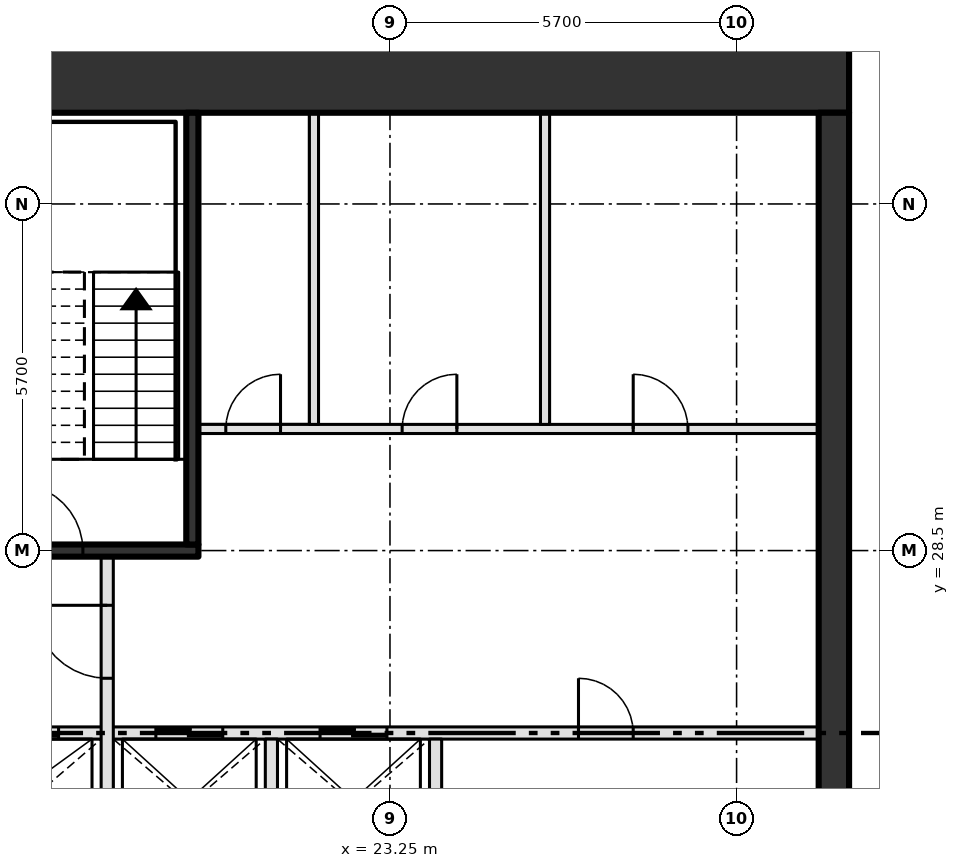
"""IFC4 building model, lengths in metres.
Left out: names, types, materials, properties, quantities, classifications, styles, units other than length and angle.
Written with IfcOpenShell. Run it as: python <this file> out.ifc"""

import sys

from ifc_helpers import new_model, si_unit, direction, frame, frame_2d, origin, place, context, subcontext, project, spatial, rectangle, extrude, element, fill, save


model = new_model("IFC4")
c1 = context("Model", 3, precision=1e-05, world=origin(), true_north=direction((0.0, 1.0)))
c2 = subcontext(c1, "Body", "Model", "MODEL_VIEW")
j1 = project(units=[si_unit("LENGTHUNIT", "METRE"), si_unit("PLANEANGLEUNIT", "RADIAN")], contexts=[c1])
p1 = place(None, origin())
s1 = spatial("IfcSite", under=j1, at=p1, CompositionType="ELEMENT")
p2 = place(p1, origin())
s2 = spatial("IfcBuilding", under=s1, at=p2, CompositionType="ELEMENT")
p3 = place(p2, frame((0.0, 0.0, 366.6)))
s3 = spatial("IfcBuildingStorey", under=s2, at=p3, CompositionType="ELEMENT", Elevation=366.6)
p4 = place(p3, frame((8.0, 36.3, -0.3), z_axis=(0.0, 0.0, 1.0), x_axis=(1.0, 0.0, 0.0)))
e1 = element("IfcWall", 1, at=p4, inside=s3, PredefinedType="SHEAR", context=c2, shape_type="SweptSolid", body=[
    extrude(rectangle(XDim=22.8, YDim=1.2, at=frame_2d((11.4, 0.0))), origin(), (0.0, 0.0, 1.0), 4.2),
])
p5 = place(p4, frame((2.3, 0.0, 0.3)))
e2 = element("IfcOpeningElement", 2, at=p5, cuts=e1, PredefinedType="OPENING", context=c2, shape_type="SweptSolid", body=[
    extrude(rectangle(XDim=1.8, YDim=2.1, at=frame_2d((0.9, 1.05))), frame((0.0, 0.61, 0.0), z_axis=(0.0, -1.0, 0.0), x_axis=(1.0, 0.0, 0.0)), (0.0, 0.0, 1.0), 1.22),
])
p6 = place(p3, frame((30.55, 14.6, -0.3), z_axis=(0.0, 0.0, 1.0), x_axis=(0.0, 1.0, 0.0)))
e3 = element("IfcWall", 3, at=p6, inside=s3, PredefinedType="SHEAR", context=c2, shape_type="SweptSolid", body=[
    extrude(rectangle(XDim=21.1, YDim=0.5, at=frame_2d((10.55, 0.0))), origin(), (0.0, 0.0, 1.0), 4.2),
])
p7 = place(p3, frame((13.35, 25.5, 0.0), z_axis=(0.0, 0.0, 1.0), x_axis=(1.0, 0.0, 0.0)))
e4 = element("IfcWall", 4, at=p7, inside=s3, PredefinedType="SOLIDWALL", context=c2, shape_type="SweptSolid", body=[
    extrude(rectangle(XDim=16.95, YDim=0.2, at=frame_2d((8.475, 0.0))), origin(), (0.0, 0.0, 1.0), 3.9),
])
p8 = place(p7, frame((0.65, 0.0, 0.0)))
e5 = element("IfcOpeningElement", 5, at=p8, cuts=e4, PredefinedType="OPENING", context=c2, shape_type="SweptSolid", body=[
    extrude(rectangle(XDim=1.1, YDim=2.1, at=frame_2d((0.55, 1.05))), frame((0.0, 0.11, 0.0), z_axis=(0.0, -1.0, 0.0), x_axis=(1.0, 0.0, 0.0)), (0.0, 0.0, 1.0), 0.22),
])
p9 = place(p7, frame((3.35, 0.0, 0.0)))
e6 = element("IfcOpeningElement", 6, at=p9, cuts=e4, PredefinedType="OPENING", context=c2, shape_type="SweptSolid", body=[
    extrude(rectangle(XDim=1.1, YDim=2.1, at=frame_2d((0.55, 1.05))), frame((0.0, 0.11, 0.0), z_axis=(0.0, -1.0, 0.0), x_axis=(1.0, 0.0, 0.0)), (0.0, 0.0, 1.0), 0.22),
])
p10 = place(p7, frame((6.05, 0.0, 0.0)))
e7 = element("IfcOpeningElement", 7, at=p10, cuts=e4, PredefinedType="OPENING", context=c2, shape_type="SweptSolid", body=[
    extrude(rectangle(XDim=1.1, YDim=2.1, at=frame_2d((0.55, 1.05))), frame((0.0, 0.11, 0.0), z_axis=(0.0, -1.0, 0.0), x_axis=(1.0, 0.0, 0.0)), (0.0, 0.0, 1.0), 0.22),
])
p11 = place(p7, frame((8.75, 0.0, 0.0)))
e8 = element("IfcOpeningElement", 8, at=p11, cuts=e4, PredefinedType="OPENING", context=c2, shape_type="SweptSolid", body=[
    extrude(rectangle(XDim=1.1, YDim=2.1, at=frame_2d((0.55, 1.05))), frame((0.0, 0.11, 0.0), z_axis=(0.0, -1.0, 0.0), x_axis=(1.0, 0.0, 0.0)), (0.0, 0.0, 1.0), 0.22),
])
p12 = place(p7, frame((13.0, 0.0, 0.0)))
e9 = element("IfcOpeningElement", 9, at=p12, cuts=e4, PredefinedType="OPENING", context=c2, shape_type="SweptSolid", body=[
    extrude(rectangle(XDim=0.9, YDim=2.1, at=frame_2d((0.45, 1.05))), frame((0.0, 0.11, 0.0), z_axis=(0.0, -1.0, 0.0), x_axis=(1.0, 0.0, 0.0)), (0.0, 0.0, 1.0), 0.22),
])
p13 = place(p3, frame((13.35, 28.5, 0.0), z_axis=(0.0, 0.0, 1.0), x_axis=(1.0, 0.0, 0.0)))
e10 = element("IfcWall", 10, at=p13, inside=s3, PredefinedType="SOLIDWALL", context=c2, shape_type="SweptSolid", body=[
    extrude(rectangle(XDim=6.75, YDim=0.2, at=frame_2d((3.375, 0.0))), origin(), (0.0, 0.0, 1.0), 3.9),
])
p14 = place(p13, frame((0.95, 0.0, 0.0)))
e11 = element("IfcOpeningElement", 11, at=p14, cuts=e10, PredefinedType="OPENING", context=c2, shape_type="SweptSolid", body=[
    extrude(rectangle(XDim=1.2, YDim=2.1, at=frame_2d((0.6, 1.05))), frame((0.0, 0.11, 0.0), z_axis=(0.0, -1.0, 0.0), x_axis=(1.0, 0.0, 0.0)), (0.0, 0.0, 1.0), 0.22),
])
p15 = place(p13, frame((3.75, 0.0, 0.0)))
e12 = element("IfcOpeningElement", 12, at=p15, cuts=e10, PredefinedType="OPENING", context=c2, shape_type="SweptSolid", body=[
    extrude(rectangle(XDim=1.1, YDim=2.1, at=frame_2d((0.55, 1.05))), frame((0.0, 0.11, 0.0), z_axis=(0.0, -1.0, 0.0), x_axis=(1.0, 0.0, 0.0)), (0.0, 0.0, 1.0), 0.22),
])
p16 = place(p3, frame((20.1, 30.5, 0.0), z_axis=(0.0, 0.0, 1.0), x_axis=(1.0, 0.0, 0.0)))
e13 = element("IfcWall", 13, at=p16, inside=s3, PredefinedType="PARTITIONING", context=c2, shape_type="SweptSolid", body=[
    extrude(rectangle(XDim=10.2, YDim=0.15, at=frame_2d((5.1, 0.0))), origin(), (0.0, 0.0, 1.0), 3.9),
])
p17 = place(p16, frame((0.45, 0.0, 0.0)))
e14 = element("IfcOpeningElement", 14, at=p17, cuts=e13, PredefinedType="OPENING", context=c2, shape_type="SweptSolid", body=[
    extrude(rectangle(XDim=0.9, YDim=2.1, at=frame_2d((0.45, 1.05))), frame((0.0, 0.085, 0.0), z_axis=(0.0, -1.0, 0.0), x_axis=(1.0, 0.0, 0.0)), (0.0, 0.0, 1.0), 0.17),
])
p18 = place(p16, frame((3.35, 0.0, 0.0)))
e15 = element("IfcOpeningElement", 15, at=p18, cuts=e13, PredefinedType="OPENING", context=c2, shape_type="SweptSolid", body=[
    extrude(rectangle(XDim=0.9, YDim=2.1, at=frame_2d((0.45, 1.05))), frame((0.0, 0.085, 0.0), z_axis=(0.0, -1.0, 0.0), x_axis=(1.0, 0.0, 0.0)), (0.0, 0.0, 1.0), 0.17),
])
p19 = place(p16, frame((7.15, 0.0, 0.0)))
e16 = element("IfcOpeningElement", 16, at=p19, cuts=e13, PredefinedType="OPENING", context=c2, shape_type="SweptSolid", body=[
    extrude(rectangle(XDim=0.9, YDim=2.1, at=frame_2d((0.45, 1.05))), frame((0.0, 0.085, 0.0), z_axis=(0.0, -1.0, 0.0), x_axis=(1.0, 0.0, 0.0)), (0.0, 0.0, 1.0), 0.17),
])
p20 = place(p3, frame((18.6, 23.25, 0.0), z_axis=(0.0, 0.0, 1.0), x_axis=(0.0, 1.0, 0.0)))
e17 = element("IfcWall", 17, at=p20, inside=s3, PredefinedType="SOLIDWALL", context=c2, shape_type="SweptSolid", body=[
    extrude(rectangle(XDim=5.15, YDim=0.2, at=frame_2d((2.575, 0.0))), origin(), (0.0, 0.0, 1.0), 3.9),
])
p21 = place(p20, frame((3.15, 0.0, 0.0)))
e18 = element("IfcOpeningElement", 18, at=p21, cuts=e17, PredefinedType="OPENING", context=c2, shape_type="SweptSolid", body=[
    extrude(rectangle(XDim=1.2, YDim=2.1, at=frame_2d((0.6, 1.05))), frame((0.0, 0.11, 0.0), z_axis=(0.0, -1.0, 0.0), x_axis=(1.0, 0.0, 0.0)), (0.0, 0.0, 1.0), 0.22),
])
p22 = place(p3, frame((20.0, 28.6, 0.0), z_axis=(0.0, 0.0, 1.0), x_axis=(0.0, 1.0, 0.0)))
e19 = element("IfcWall", 19, at=p22, inside=s3, PredefinedType="SOLIDWALL", context=c2, shape_type="SweptSolid", body=[
    extrude(rectangle(XDim=7.1, YDim=0.2, at=frame_2d((3.55, 0.0))), origin(), (0.0, 0.0, 1.0), 3.9),
])
p23 = place(p3, frame((21.3, 20.775, 0.0), z_axis=(0.0, 0.0, 1.0), x_axis=(0.0, 1.0, 0.0)))
e20 = element("IfcWall", 20, at=p23, inside=s3, PredefinedType="SOLIDWALL", context=c2, shape_type="SweptSolid", body=[
    extrude(rectangle(XDim=4.625, YDim=0.2, at=frame_2d((2.312, 0.0))), origin(), (0.0, 0.0, 1.0), 3.9),
])
p24 = place(p3, frame((22.0, 30.575, 0.0), z_axis=(0.0, 0.0, 1.0), x_axis=(0.0, 1.0, 0.0)))
e21 = element("IfcWall", 21, at=p24, inside=s3, PredefinedType="PARTITIONING", context=c2, shape_type="SweptSolid", body=[
    extrude(rectangle(XDim=5.125, YDim=0.15, at=frame_2d((2.562, 0.0))), origin(), (0.0, 0.0, 1.0), 3.9),
])
p25 = place(p3, frame((24.0, 23.25, 0.0), z_axis=(0.0, 0.0, 1.0), x_axis=(0.0, 1.0, 0.0)))
e22 = element("IfcWall", 22, at=p25, inside=s3, PredefinedType="SOLIDWALL", context=c2, shape_type="SweptSolid", body=[
    extrude(rectangle(XDim=2.15, YDim=0.2, at=frame_2d((1.075, 0.0))), origin(), (0.0, 0.0, 1.0), 3.9),
])
p26 = place(p3, frame((25.8, 30.575, 0.0), z_axis=(0.0, 0.0, 1.0), x_axis=(0.0, 1.0, 0.0)))
e23 = element("IfcWall", 23, at=p26, inside=s3, PredefinedType="PARTITIONING", context=c2, shape_type="SweptSolid", body=[
    extrude(rectangle(XDim=5.125, YDim=0.15, at=frame_2d((2.562, 0.0))), origin(), (0.0, 0.0, 1.0), 3.9),
])
p27 = place(p9, origin())
e24 = element("IfcDoor", 24, at=p27, inside=s3, OperationType="SLIDING_TO_LEFT", PredefinedType="DOOR", context=c2, shape_type="SweptSolid", body=[
    extrude(rectangle(XDim=1.1, YDim=2.1, at=frame_2d((0.55, 1.05))), frame((0.0, 0.025, 0.0), z_axis=(0.0, -1.0, 0.0), x_axis=(1.0, 0.0, 0.0)), (0.0, 0.0, 1.0), 0.05),
])
fill(e6, e24)
p28 = place(p10, origin())
e25 = element("IfcDoor", 25, at=p28, inside=s3, OperationType="SLIDING_TO_LEFT", PredefinedType="DOOR", context=c2, shape_type="SweptSolid", body=[
    extrude(rectangle(XDim=1.1, YDim=2.1, at=frame_2d((0.55, 1.05))), frame((0.0, 0.025, 0.0), z_axis=(0.0, -1.0, 0.0), x_axis=(1.0, 0.0, 0.0)), (0.0, 0.0, 1.0), 0.05),
])
fill(e7, e25)
p29 = place(p11, origin())
e26 = element("IfcDoor", 26, at=p29, inside=s3, OperationType="SLIDING_TO_LEFT", PredefinedType="DOOR", context=c2, shape_type="SweptSolid", body=[
    extrude(rectangle(XDim=1.1, YDim=2.1, at=frame_2d((0.55, 1.05))), frame((0.0, 0.025, 0.0), z_axis=(0.0, -1.0, 0.0), x_axis=(1.0, 0.0, 0.0)), (0.0, 0.0, 1.0), 0.05),
])
fill(e8, e26)
p30 = place(p12, origin())
e27 = element("IfcDoor", 27, at=p30, inside=s3, OperationType="SINGLE_SWING_LEFT", PredefinedType="DOOR", context=c2, shape_type="SweptSolid", body=[
    extrude(rectangle(XDim=0.9, YDim=2.1, at=frame_2d((0.45, 1.05))), frame((0.0, 0.025, 0.0), z_axis=(0.0, -1.0, 0.0), x_axis=(1.0, 0.0, 0.0)), (0.0, 0.0, 1.0), 0.05),
])
fill(e9, e27)
p31 = place(p17, origin())
e28 = element("IfcDoor", 28, at=p31, inside=s3, OperationType="SINGLE_SWING_RIGHT", PredefinedType="DOOR", context=c2, shape_type="SweptSolid", body=[
    extrude(rectangle(XDim=0.9, YDim=2.1, at=frame_2d((0.45, 1.05))), frame((0.0, 0.025, 0.0), z_axis=(0.0, -1.0, 0.0), x_axis=(1.0, 0.0, 0.0)), (0.0, 0.0, 1.0), 0.05),
])
fill(e14, e28)
p32 = place(p18, origin())
e29 = element("IfcDoor", 29, at=p32, inside=s3, OperationType="SINGLE_SWING_RIGHT", PredefinedType="DOOR", context=c2, shape_type="SweptSolid", body=[
    extrude(rectangle(XDim=0.9, YDim=2.1, at=frame_2d((0.45, 1.05))), frame((0.0, 0.025, 0.0), z_axis=(0.0, -1.0, 0.0), x_axis=(1.0, 0.0, 0.0)), (0.0, 0.0, 1.0), 0.05),
])
fill(e15, e29)
p33 = place(p19, origin())
e30 = element("IfcDoor", 30, at=p33, inside=s3, OperationType="SINGLE_SWING_LEFT", PredefinedType="DOOR", context=c2, shape_type="SweptSolid", body=[
    extrude(rectangle(XDim=0.9, YDim=2.1, at=frame_2d((0.45, 1.05))), frame((0.0, 0.025, 0.0), z_axis=(0.0, -1.0, 0.0), x_axis=(1.0, 0.0, 0.0)), (0.0, 0.0, 1.0), 0.05),
])
fill(e16, e30)
p34 = place(p15, origin())
e31 = element("IfcDoor", 31, at=p34, inside=s3, OperationType="SINGLE_SWING_LEFT", PredefinedType="DOOR", context=c2, shape_type="SweptSolid", body=[
    extrude(rectangle(XDim=1.1, YDim=2.1, at=frame_2d((0.55, 1.05))), frame((0.0, 0.025, 0.0), z_axis=(0.0, -1.0, 0.0), x_axis=(1.0, 0.0, 0.0)), (0.0, 0.0, 1.0), 0.05),
])
fill(e12, e31)
p35 = place(p21, origin())
e32 = element("IfcDoor", 32, at=p35, inside=s3, OperationType="SINGLE_SWING_RIGHT", PredefinedType="DOOR", context=c2, shape_type="SweptSolid", body=[
    extrude(rectangle(XDim=1.2, YDim=2.1, at=frame_2d((0.6, 1.05))), frame((0.0, 0.025, 0.0), z_axis=(0.0, -1.0, 0.0), x_axis=(1.0, 0.0, 0.0)), (0.0, 0.0, 1.0), 0.05),
])
fill(e18, e32)
save(model, sys.argv[1])
